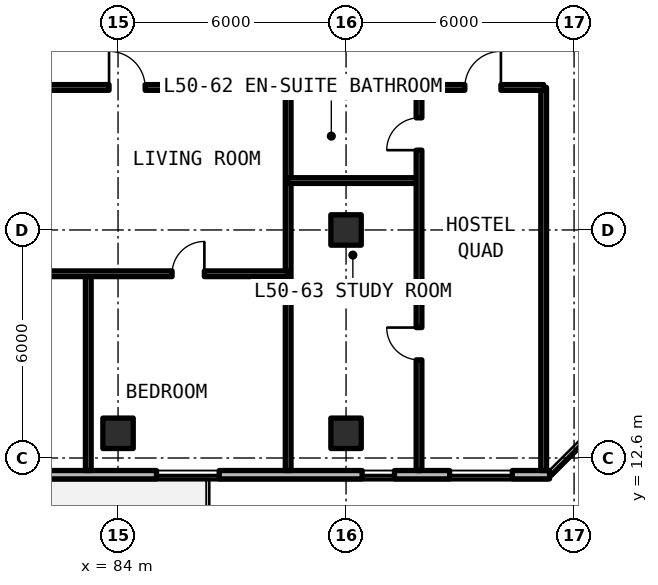
"""IFC4 building model, lengths in metres.
Left out: names, types, materials, properties, quantities, classifications, styles, units other than length and angle.
Written with IfcOpenShell. Run it as: python <this file> out.ifc"""

import sys

from ifc_helpers import new_model, si_unit, direction, frame, frame_2d, origin, origin_2d, place, context, subcontext, project, spatial, rectangle, extrude, element, fill, save


model = new_model("IFC4")
c1 = context("Model", 3, precision=1e-05, world=origin(), true_north=direction((0.0, 1.0)))
c2 = subcontext(c1, "Body", "Model", "MODEL_VIEW")
j1 = project(units=[si_unit("LENGTHUNIT", "METRE"), si_unit("PLANEANGLEUNIT", "RADIAN")], contexts=[c1])
p1 = place(None, origin())
s1 = spatial("IfcSite", under=j1, at=p1, CompositionType="ELEMENT")
p2 = place(p1, origin())
s2 = spatial("IfcBuilding", under=s1, at=p2, CompositionType="ELEMENT")
p3 = place(p2, frame((0.0, 0.0, 181.83)))
s3 = spatial("IfcBuildingStorey", under=s2, at=p3, CompositionType="ELEMENT", Elevation=181.83)
for number, where, z_axis, x_axis in (
    (1, (90.0, 18.6, 0.0), (0.0, 0.0, 1.0), (1.0, 0.0, 0.0)),
    (2, (84.0, 13.25, 0.0), (0.0, 0.0, 1.0), (1.0, 0.0, 0.0)),
    (3, (90.0, 13.25, 0.0), (0.0, 0.0, 1.0), (1.0, 0.0, 0.0)),
):
    element("IfcColumn", number, at=place(p3, frame(where, z_axis=z_axis, x_axis=x_axis)), inside=s3, PredefinedType="COLUMN", context=c2, shape_type="SweptSolid", body=[
        extrude(rectangle(XDim=0.8, YDim=0.8, at=origin_2d()), origin(), (0.0, 0.0, 1.0), 3.3),
    ])
p4 = place(p3, frame((52.11, 12.16, 0.0), z_axis=(0.0, 0.0, 1.0), x_axis=(1.0, 0.0, 0.0)))
e4 = element("IfcWall", 4, at=p4, inside=s3, PredefinedType="SOLIDWALL", context=c2, shape_type="SweptSolid", body=[
    extrude(rectangle(XDim=43.244, YDim=0.22, at=frame_2d((21.622, 0.0))), origin(), (0.0, 0.0, 1.0), 3.08),
])
p5 = place(p4, frame((4.19, 0.0, 0.0)))
e5 = element("IfcOpeningElement", 5, at=p5, cuts=e4, PredefinedType="OPENING", context=c2, shape_type="SweptSolid", body=[
    extrude(rectangle(XDim=1.1, YDim=2.15, at=frame_2d((0.55, 1.075))), frame((0.0, 0.12, 0.0), z_axis=(0.0, -1.0, 0.0), x_axis=(1.0, 0.0, 0.0)), (0.0, 0.0, 1.0), 0.24),
])
p6 = place(p4, frame((17.54, 0.0, 0.0)))
e6 = element("IfcOpeningElement", 6, at=p6, cuts=e4, PredefinedType="OPENING", context=c2, shape_type="SweptSolid", body=[
    extrude(rectangle(XDim=1.1, YDim=2.15, at=frame_2d((0.55, 1.075))), frame((0.0, 0.12, 0.0), z_axis=(0.0, -1.0, 0.0), x_axis=(1.0, 0.0, 0.0)), (0.0, 0.0, 1.0), 0.24),
])
p7 = place(p4, frame((28.89, 0.0, 0.0)))
e7 = element("IfcOpeningElement", 7, at=p7, cuts=e4, PredefinedType="OPENING", context=c2, shape_type="SweptSolid", body=[
    extrude(rectangle(XDim=1.1, YDim=2.15, at=frame_2d((0.55, 1.075))), frame((0.0, 0.12, 0.0), z_axis=(0.0, -1.0, 0.0), x_axis=(1.0, 0.0, 0.0)), (0.0, 0.0, 1.0), 0.24),
])
p8 = place(p4, frame((8.66, 0.0, 0.78)))
e8 = element("IfcOpeningElement", 8, at=p8, cuts=e4, PredefinedType="OPENING", context=c2, shape_type="SweptSolid", body=[
    extrude(rectangle(XDim=1.65, YDim=1.66, at=frame_2d((0.825, 0.83))), frame((0.0, 0.12, 0.0), z_axis=(0.0, -1.0, 0.0), x_axis=(1.0, 0.0, 0.0)), (0.0, 0.0, 1.0), 0.24),
])
p9 = place(p4, frame((14.759, 0.0, 0.78)))
e9 = element("IfcOpeningElement", 9, at=p9, cuts=e4, PredefinedType="OPENING", context=c2, shape_type="SweptSolid", body=[
    extrude(rectangle(XDim=1.65, YDim=1.66, at=frame_2d((0.825, 0.83))), frame((0.0, 0.12, 0.0), z_axis=(0.0, -1.0, 0.0), x_axis=(1.0, 0.0, 0.0)), (0.0, 0.0, 1.0), 0.24),
])
p10 = place(p4, frame((32.902, 0.0, 0.78)))
e10 = element("IfcOpeningElement", 10, at=p10, cuts=e4, PredefinedType="OPENING", context=c2, shape_type="SweptSolid", body=[
    extrude(rectangle(XDim=1.65, YDim=1.66, at=frame_2d((0.825, 0.83))), frame((0.0, 0.12, 0.0), z_axis=(0.0, -1.0, 0.0), x_axis=(1.0, 0.0, 0.0)), (0.0, 0.0, 1.0), 0.24),
])
p11 = place(p4, frame((38.313, 0.0, 0.78)))
e11 = element("IfcOpeningElement", 11, at=p11, cuts=e4, PredefinedType="OPENING", context=c2, shape_type="SweptSolid", body=[
    extrude(rectangle(XDim=0.85, YDim=1.65, at=frame_2d((0.425, 0.825))), frame((0.0, 0.12, 0.0), z_axis=(0.0, -1.0, 0.0), x_axis=(1.0, 0.0, 0.0)), (0.0, 0.0, 1.0), 0.24),
])
p12 = place(p4, frame((40.615, 0.0, 0.78)))
e12 = element("IfcOpeningElement", 12, at=p12, cuts=e4, PredefinedType="OPENING", context=c2, shape_type="SweptSolid", body=[
    extrude(rectangle(XDim=1.65, YDim=1.66, at=frame_2d((0.825, 0.83))), frame((0.0, 0.12, 0.0), z_axis=(0.0, -1.0, 0.0), x_axis=(1.0, 0.0, 0.0)), (0.0, 0.0, 1.0), 0.24),
])
for number, where, z_axis, x_axis in (
    (13, (95.2, 12.27, 0.0), (0.0, 0.0, 1.0), (0.0, 1.0, 0.0)),
    (14, (88.477, 12.27, 0.0), (0.0, 0.0, 1.0), (0.0, 1.0, 0.0)),
):
    element("IfcWall", number, at=place(p3, frame(where, z_axis=z_axis, x_axis=x_axis)), inside=s3, PredefinedType="SOLIDWALL", context=c2, shape_type="SweptSolid", body=[
        extrude(rectangle(XDim=10.08, YDim=0.15, at=frame_2d((5.04, 0.0))), origin(), (0.0, 0.0, 1.0), 2.35),
    ])
p13 = place(p3, frame((83.217, 12.27, 0.0), z_axis=(0.0, 0.0, 1.0), x_axis=(0.0, 1.0, 0.0)))
e15 = element("IfcWall", 15, at=p13, inside=s3, PredefinedType="PARTITIONING", context=c2, shape_type="SweptSolid", body=[
    extrude(rectangle(XDim=5.178, YDim=0.15, at=frame_2d((2.589, 0.0))), origin(), (0.0, 0.0, 1.0), 2.35),
])
p14 = place(p3, frame((77.52, 17.448, 0.0), z_axis=(0.0, 0.0, 1.0), x_axis=(1.0, 0.0, 0.0)))
e16 = element("IfcWall", 16, at=p14, inside=s3, PredefinedType="PARTITIONING", context=c2, shape_type="SweptSolid", body=[
    extrude(rectangle(XDim=10.957, YDim=0.15, at=frame_2d((5.479, 0.0))), origin(), (0.0, 0.0, 1.0), 2.35),
])
p15 = place(p14, frame((3.624, 0.0, 0.0)))
e17 = element("IfcOpeningElement", 17, at=p15, cuts=e16, PredefinedType="OPENING", context=c2, shape_type="SweptSolid", body=[
    extrude(rectangle(XDim=0.85, YDim=2.1, at=frame_2d((0.425, 1.05))), frame((0.0, 0.085, 0.0), z_axis=(0.0, -1.0, 0.0), x_axis=(1.0, 0.0, 0.0)), (0.0, 0.0, 1.0), 0.17),
])
p16 = place(p14, frame((7.902, 0.0, 0.0)))
e18 = element("IfcOpeningElement", 18, at=p16, cuts=e16, PredefinedType="OPENING", context=c2, shape_type="SweptSolid", body=[
    extrude(rectangle(XDim=0.85, YDim=2.1, at=frame_2d((0.425, 1.05))), frame((0.0, 0.085, 0.0), z_axis=(0.0, -1.0, 0.0), x_axis=(1.0, 0.0, 0.0)), (0.0, 0.0, 1.0), 0.17),
])
p17 = place(p3, frame((77.52, 22.35, 0.0), z_axis=(0.0, 0.0, 1.0), x_axis=(1.0, 0.0, 0.0)))
e19 = element("IfcWall", 19, at=p17, inside=s3, PredefinedType="SOLIDWALL", context=c2, shape_type="SweptSolid", body=[
    extrude(rectangle(XDim=10.957, YDim=0.15, at=frame_2d((5.479, 0.0))), origin(), (0.0, 0.0, 1.0), 2.35),
])
p18 = place(p17, frame((6.243, 0.0, 0.0)))
e20 = element("IfcOpeningElement", 20, at=p18, cuts=e19, PredefinedType="OPENING", context=c2, shape_type="SweptSolid", body=[
    extrude(rectangle(XDim=0.95, YDim=2.15, at=frame_2d((0.475, 1.075))), frame((0.0, 0.085, 0.0), z_axis=(0.0, -1.0, 0.0), x_axis=(1.0, 0.0, 0.0)), (0.0, 0.0, 1.0), 0.17),
])
p19 = place(p3, frame((88.477, 19.9, 0.0), z_axis=(0.0, 0.0, 1.0), x_axis=(1.0, 0.0, 0.0)))
e21 = element("IfcWall", 21, at=p19, inside=s3, PredefinedType="PARTITIONING", context=c2, shape_type="SweptSolid", body=[
    extrude(rectangle(XDim=3.443, YDim=0.15, at=frame_2d((1.722, 0.0))), origin(), (0.0, 0.0, 1.0), 2.35),
])
p20 = place(p3, frame((91.92, 12.27, 0.0), z_axis=(0.0, 0.0, 1.0), x_axis=(0.0, 1.0, 0.0)))
e22 = element("IfcWall", 22, at=p20, inside=s3, PredefinedType="PARTITIONING", context=c2, shape_type="SweptSolid", body=[
    extrude(rectangle(XDim=10.08, YDim=0.15, at=frame_2d((5.04, 0.0))), origin(), (0.0, 0.0, 1.0), 2.35),
])
p21 = place(p20, frame((2.912, 0.0, 0.0)))
e23 = element("IfcOpeningElement", 23, at=p21, cuts=e22, PredefinedType="OPENING", context=c2, shape_type="SweptSolid", body=[
    extrude(rectangle(XDim=0.85, YDim=2.1, at=frame_2d((0.425, 1.05))), frame((0.0, 0.085, 0.0), z_axis=(0.0, -1.0, 0.0), x_axis=(1.0, 0.0, 0.0)), (0.0, 0.0, 1.0), 0.17),
])
p22 = place(p20, frame((8.43, 0.0, 0.0)))
e24 = element("IfcOpeningElement", 24, at=p22, cuts=e22, PredefinedType="OPENING", context=c2, shape_type="SweptSolid", body=[
    extrude(rectangle(XDim=0.85, YDim=2.1, at=frame_2d((0.425, 1.05))), frame((0.0, 0.085, 0.0), z_axis=(0.0, -1.0, 0.0), x_axis=(1.0, 0.0, 0.0)), (0.0, 0.0, 1.0), 0.17),
])
p23 = place(p3, frame((88.477, 22.35, 0.0), z_axis=(0.0, 0.0, 1.0), x_axis=(1.0, 0.0, 0.0)))
e25 = element("IfcWall", 25, at=p23, inside=s3, PredefinedType="SOLIDWALL", context=c2, shape_type="SweptSolid", body=[
    extrude(rectangle(XDim=6.723, YDim=0.15, at=frame_2d((3.362, 0.0))), origin(), (0.0, 0.0, 1.0), 2.35),
])
p24 = place(p23, frame((4.648, 0.0, 0.0)))
e26 = element("IfcOpeningElement", 26, at=p24, cuts=e25, PredefinedType="OPENING", context=c2, shape_type="SweptSolid", body=[
    extrude(rectangle(XDim=0.95, YDim=2.15, at=frame_2d((0.475, 1.075))), frame((0.0, 0.085, 0.0), z_axis=(0.0, -1.0, 0.0), x_axis=(1.0, 0.0, 0.0)), (0.0, 0.0, 1.0), 0.17),
])
p25 = place(p10, origin())
e27 = element("IfcWindow", 27, at=p25, inside=s3, PartitioningType="SINGLE_PANEL", PredefinedType="WINDOW", context=c2, shape_type="SweptSolid", body=[
    extrude(rectangle(XDim=1.65, YDim=1.66, at=frame_2d((0.825, 0.83))), frame((0.0, 0.03, 0.0), z_axis=(0.0, -1.0, 0.0), x_axis=(1.0, 0.0, 0.0)), (0.0, 0.0, 1.0), 0.06),
])
fill(e10, e27)
p26 = place(p11, origin())
e28 = element("IfcWindow", 28, at=p26, inside=s3, PartitioningType="SINGLE_PANEL", PredefinedType="WINDOW", context=c2, shape_type="SweptSolid", body=[
    extrude(rectangle(XDim=0.85, YDim=1.65, at=frame_2d((0.425, 0.825))), frame((0.0, 0.03, 0.0), z_axis=(0.0, -1.0, 0.0), x_axis=(1.0, 0.0, 0.0)), (0.0, 0.0, 1.0), 0.06),
])
fill(e11, e28)
p27 = place(p12, origin())
e29 = element("IfcWindow", 29, at=p27, inside=s3, PartitioningType="SINGLE_PANEL", PredefinedType="WINDOW", context=c2, shape_type="SweptSolid", body=[
    extrude(rectangle(XDim=1.65, YDim=1.66, at=frame_2d((0.825, 0.83))), frame((0.0, 0.03, 0.0), z_axis=(0.0, -1.0, 0.0), x_axis=(1.0, 0.0, 0.0)), (0.0, 0.0, 1.0), 0.06),
])
fill(e12, e29)
p28 = place(p16, origin())
e30 = element("IfcDoor", 30, at=p28, inside=s3, OperationType="SINGLE_SWING_RIGHT", PredefinedType="DOOR", context=c2, shape_type="SweptSolid", body=[
    extrude(rectangle(XDim=0.85, YDim=2.1, at=frame_2d((0.425, 1.05))), frame((0.0, 0.025, 0.0), z_axis=(0.0, -1.0, 0.0), x_axis=(1.0, 0.0, 0.0)), (0.0, 0.0, 1.0), 0.05),
])
fill(e18, e30)
p29 = place(p18, origin())
e31 = element("IfcDoor", 31, at=p29, inside=s3, OperationType="SINGLE_SWING_LEFT", PredefinedType="DOOR", context=c2, shape_type="SweptSolid", body=[
    extrude(rectangle(XDim=0.95, YDim=2.15, at=frame_2d((0.475, 1.075))), frame((0.0, 0.025, 0.0), z_axis=(0.0, -1.0, 0.0), x_axis=(1.0, 0.0, 0.0)), (0.0, 0.0, 1.0), 0.05),
])
fill(e20, e31)
p30 = place(p21, origin())
e32 = element("IfcDoor", 32, at=p30, inside=s3, OperationType="SINGLE_SWING_RIGHT", PredefinedType="DOOR", context=c2, shape_type="SweptSolid", body=[
    extrude(rectangle(XDim=0.85, YDim=2.1, at=frame_2d((0.425, 1.05))), frame((0.0, 0.025, 0.0), z_axis=(0.0, -1.0, 0.0), x_axis=(1.0, 0.0, 0.0)), (0.0, 0.0, 1.0), 0.05),
])
fill(e23, e32)
p31 = place(p22, origin())
e33 = element("IfcDoor", 33, at=p31, inside=s3, OperationType="SINGLE_SWING_LEFT", PredefinedType="DOOR", context=c2, shape_type="SweptSolid", body=[
    extrude(rectangle(XDim=0.85, YDim=2.1, at=frame_2d((0.425, 1.05))), frame((0.0, 0.025, 0.0), z_axis=(0.0, -1.0, 0.0), x_axis=(1.0, 0.0, 0.0)), (0.0, 0.0, 1.0), 0.05),
])
fill(e24, e33)
p32 = place(p24, origin())
e34 = element("IfcDoor", 34, at=p32, inside=s3, OperationType="SINGLE_SWING_RIGHT", PredefinedType="DOOR", context=c2, shape_type="SweptSolid", body=[
    extrude(rectangle(XDim=0.95, YDim=2.15, at=frame_2d((0.475, 1.075))), frame((0.0, 0.025, 0.0), z_axis=(0.0, -1.0, 0.0), x_axis=(1.0, 0.0, 0.0)), (0.0, 0.0, 1.0), 0.05),
])
fill(e26, e34)
save(model, sys.argv[1])
